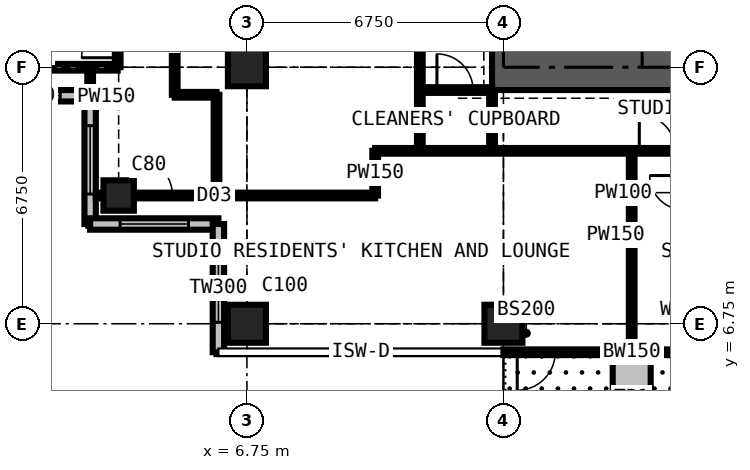
"""IFC4 building model, lengths in metres.
Left out: names, types, materials, properties, quantities, classifications, styles, units other than length and angle.
Written with IfcOpenShell. Run it as: python <this file> out.ifc"""

import sys

from ifc_helpers import new_model, si_unit, direction, frame, frame_2d, origin, origin_2d, place, context, subcontext, project, spatial, rectangle, extrude, element, fill, save


model = new_model("IFC4")
c1 = context("Model", 3, precision=1e-05, world=origin(), true_north=direction((0.0, 1.0)))
c2 = subcontext(c1, "Body", "Model", "MODEL_VIEW")
j1 = project(units=[si_unit("LENGTHUNIT", "METRE"), si_unit("PLANEANGLEUNIT", "RADIAN")], contexts=[c1])
p1 = place(None, origin())
s1 = spatial("IfcSite", under=j1, at=p1, CompositionType="ELEMENT")
p2 = place(p1, origin())
s2 = spatial("IfcBuilding", under=s1, at=p2, CompositionType="ELEMENT")
p3 = place(p2, frame((0.0, 0.0, 240.3)))
s3 = spatial("IfcBuildingStorey", under=s2, at=p3, CompositionType="ELEMENT", Elevation=240.3)
p4 = place(p3, frame((3.375, 10.125, 0.0), z_axis=(0.0, 0.0, 1.0), x_axis=(1.0, 0.0, 0.0)))
e1 = element("IfcColumn", 1, at=p4, inside=s3, PredefinedType="COLUMN", context=c2, shape_type="SweptSolid", body=[
    extrude(rectangle(XDim=0.8, YDim=0.8, at=origin_2d()), origin(), (0.0, 0.0, 1.0), 3.6),
])
for number, where, z_axis, x_axis in (
    (2, (6.75, 6.75, 0.0), (0.0, 0.0, 1.0), (1.0, 0.0, 0.0)),
    (3, (6.75, 13.5, 0.0), (0.0, 0.0, 1.0), (1.0, 0.0, 0.0)),
    (4, (13.5, 6.75, 0.0), (0.0, 0.0, 1.0), (1.0, 0.0, 0.0)),
):
    element("IfcColumn", number, at=place(p3, frame(where, z_axis=z_axis, x_axis=x_axis)), inside=s3, PredefinedType="COLUMN", context=c2, shape_type="SweptSolid", body=[
        extrude(rectangle(XDim=1.0, YDim=1.0, at=origin_2d()), origin(), (0.0, 0.0, 1.0), 3.6),
    ])
p5 = place(p3, frame((13.2, 13.5, 0.0), z_axis=(0.0, 0.0, 1.0), x_axis=(1.0, 0.0, 0.0)))
e5 = element("IfcWall", 5, at=p5, inside=s3, PredefinedType="SHEAR", context=c2, shape_type="SweptSolid", body=[
    extrude(rectangle(XDim=14.1, YDim=1.2, at=frame_2d((7.05, 0.0))), origin(), (0.0, 0.0, 1.0), 3.6),
])
p6 = place(p3, frame((-0.75, 12.75, 0.0), z_axis=(0.0, 0.0, 1.0), x_axis=(1.0, 0.0, 0.0)))
e6 = element("IfcWall", 6, at=p6, inside=s3, PredefinedType="SOLIDWALL", context=c2, shape_type="SweptSolid", body=[
    extrude(rectangle(XDim=3.375, YDim=0.3, at=frame_2d((1.688, 0.0))), origin(), (0.0, 0.0, 1.0), 3.375),
])
p7 = place(p6, frame((0.788, 0.0, 0.6)))
e7 = element("IfcOpeningElement", 7, at=p7, cuts=e6, PredefinedType="OPENING", context=c2, shape_type="SweptSolid", body=[
    extrude(rectangle(XDim=1.8, YDim=2.1, at=frame_2d((0.9, 1.05))), frame((0.0, 0.16, 0.0), z_axis=(0.0, -1.0, 0.0), x_axis=(1.0, 0.0, 0.0)), (0.0, 0.0, 1.0), 0.32),
])
p8 = place(p3, frame((2.625, 12.75, 0.0), z_axis=(0.0, 0.0, 1.0), x_axis=(0.0, -1.0, 0.0)))
e8 = element("IfcWall", 8, at=p8, inside=s3, PredefinedType="SOLIDWALL", context=c2, shape_type="SweptSolid", body=[
    extrude(rectangle(XDim=3.375, YDim=0.3, at=frame_2d((1.688, 0.0))), origin(), (0.0, 0.0, 1.0), 3.375),
])
p9 = place(p8, frame((0.788, 0.0, 0.6)))
e9 = element("IfcOpeningElement", 9, at=p9, cuts=e8, PredefinedType="OPENING", context=c2, shape_type="SweptSolid", body=[
    extrude(rectangle(XDim=1.8, YDim=2.1, at=frame_2d((0.9, 1.05))), frame((0.0, 0.16, 0.0), z_axis=(0.0, -1.0, 0.0), x_axis=(1.0, 0.0, 0.0)), (0.0, 0.0, 1.0), 0.32),
])
p10 = place(p3, frame((2.625, 9.375, 0.0), z_axis=(0.0, 0.0, 1.0), x_axis=(1.0, 0.0, 0.0)))
e10 = element("IfcWall", 10, at=p10, inside=s3, PredefinedType="SOLIDWALL", context=c2, shape_type="SweptSolid", body=[
    extrude(rectangle(XDim=3.375, YDim=0.3, at=frame_2d((1.688, 0.0))), origin(), (0.0, 0.0, 1.0), 3.375),
])
p11 = place(p10, frame((0.788, 0.0, 0.6)))
e11 = element("IfcOpeningElement", 11, at=p11, cuts=e10, PredefinedType="OPENING", context=c2, shape_type="SweptSolid", body=[
    extrude(rectangle(XDim=1.8, YDim=2.1, at=frame_2d((0.9, 1.05))), frame((0.0, 0.16, 0.0), z_axis=(0.0, -1.0, 0.0), x_axis=(1.0, 0.0, 0.0)), (0.0, 0.0, 1.0), 0.32),
])
p12 = place(p3, frame((6.0, 9.375, 0.0), z_axis=(0.0, 0.0, 1.0), x_axis=(0.0, -1.0, 0.0)))
e12 = element("IfcWall", 12, at=p12, inside=s3, PredefinedType="SOLIDWALL", context=c2, shape_type="SweptSolid", body=[
    extrude(rectangle(XDim=3.375, YDim=0.3, at=frame_2d((1.688, 0.0))), origin(), (0.0, 0.0, 1.0), 3.375),
])
p13 = place(p12, frame((0.788, 0.0, 0.6)))
e13 = element("IfcOpeningElement", 13, at=p13, cuts=e12, PredefinedType="OPENING", context=c2, shape_type="SweptSolid", body=[
    extrude(rectangle(XDim=1.8, YDim=2.1, at=frame_2d((0.9, 1.05))), frame((0.0, 0.16, 0.0), z_axis=(0.0, -1.0, 0.0), x_axis=(1.0, 0.0, 0.0)), (0.0, 0.0, 1.0), 0.32),
])
p14 = place(p3, frame((20.25, 6.0, 0.0), z_axis=(0.0, 0.0, 1.0), x_axis=(-1.0, 0.0, 0.0)))
e14 = element("IfcWall", 14, at=p14, inside=s3, PredefinedType="SOLIDWALL", context=c2, shape_type="SweptSolid", body=[
    extrude(rectangle(XDim=6.75, YDim=0.15, at=frame_2d((3.375, 0.0))), origin(), (0.0, 0.0, 1.0), 3.375),
])
p15 = place(p14, frame((0.363, 0.0, 0.0)))
e15 = element("IfcOpeningElement", 15, at=p15, cuts=e14, PredefinedType="OPENING", context=c2, shape_type="SweptSolid", body=[
    extrude(rectangle(XDim=1.0, YDim=2.2, at=frame_2d((0.5, 1.1))), frame((0.0, 0.085, 0.0), z_axis=(0.0, -1.0, 0.0), x_axis=(1.0, 0.0, 0.0)), (0.0, 0.0, 1.0), 0.17),
])
p16 = place(p14, frame((1.725, 0.0, 0.9)))
e16 = element("IfcOpeningElement", 16, at=p16, cuts=e14, PredefinedType="OPENING", context=c2, shape_type="SweptSolid", body=[
    extrude(rectangle(XDim=1.2, YDim=1.8, at=frame_2d((0.6, 0.9))), frame((0.0, 0.085, 0.0), z_axis=(0.0, -1.0, 0.0), x_axis=(1.0, 0.0, 0.0)), (0.0, 0.0, 1.0), 0.17),
])
p17 = place(p14, frame((5.387, 0.0, 0.0)))
e17 = element("IfcOpeningElement", 17, at=p17, cuts=e14, PredefinedType="OPENING", context=c2, shape_type="SweptSolid", body=[
    extrude(rectangle(XDim=1.0, YDim=2.2, at=frame_2d((0.5, 1.1))), frame((0.0, 0.085, 0.0), z_axis=(0.0, -1.0, 0.0), x_axis=(1.0, 0.0, 0.0)), (0.0, 0.0, 1.0), 0.17),
])
p18 = place(p14, frame((3.825, 0.0, 0.9)))
e18 = element("IfcOpeningElement", 18, at=p18, cuts=e14, PredefinedType="OPENING", context=c2, shape_type="SweptSolid", body=[
    extrude(rectangle(XDim=1.2, YDim=1.8, at=frame_2d((0.6, 0.9))), frame((0.0, 0.085, 0.0), z_axis=(0.0, -1.0, 0.0), x_axis=(1.0, 0.0, 0.0)), (0.0, 0.0, 1.0), 0.17),
])
p19 = place(p3, frame((16.875, 5.9, 0.0), z_axis=(0.0, 0.0, 1.0), x_axis=(0.0, -1.0, 0.0)))
e19 = element("IfcWall", 19, at=p19, inside=s3, PredefinedType="USERDEFINED", context=c2, shape_type="SweptSolid", body=[
    extrude(rectangle(XDim=2.2, YDim=1.0, at=frame_2d((1.1, 0.0))), origin(), (0.0, 0.0, 1.0), 0.9),
])
p20 = place(p3, frame((-0.734, 13.5, 0.0), z_axis=(0.0, 0.0, 1.0), x_axis=(1.0, 0.0, 0.0)))
e20 = element("IfcWall", 20, at=p20, inside=s3, PredefinedType="PARTITIONING", context=c2, shape_type="SweptSolid", body=[
    extrude(rectangle(XDim=4.084, YDim=0.175, at=frame_2d((2.042, 0.0))), origin(), (0.0, 0.0, 1.0), 2.877),
])
p21 = place(p3, frame((2.625, 12.766, 0.0), z_axis=(0.0, 0.0, 1.0), x_axis=(0.0, 1.0, 0.0)))
e21 = element("IfcWall", 21, at=p21, inside=s3, PredefinedType="PARTITIONING", context=c2, shape_type="SweptSolid", body=[
    extrude(rectangle(XDim=0.734, YDim=0.15, at=frame_2d((0.367, 0.0))), origin(), (0.0, 0.0, 1.0), 3.375),
])
p22 = place(p3, frame((2.775, 10.125, 0.0), z_axis=(0.0, 0.0, 1.0), x_axis=(1.0, 0.0, 0.0)))
e22 = element("IfcWall", 22, at=p22, inside=s3, PredefinedType="PARTITIONING", context=c2, shape_type="SweptSolid", body=[
    extrude(rectangle(XDim=7.35, YDim=0.15, at=frame_2d((3.675, 0.0))), origin(), (0.0, 0.0, 1.0), 2.877),
])
p23 = place(p22, frame((1.016, 0.0, 0.0)))
e23 = element("IfcOpeningElement", 23, at=p23, cuts=e22, PredefinedType="OPENING", context=c2, shape_type="SweptSolid", body=[
    extrude(rectangle(XDim=1.0, YDim=2.2, at=frame_2d((0.5, 1.1))), frame((0.0, 0.085, 0.0), z_axis=(0.0, -1.0, 0.0), x_axis=(1.0, 0.0, 0.0)), (0.0, 0.0, 1.0), 0.17),
])
p24 = place(p3, frame((3.35, 13.5, 0.0), z_axis=(0.0, 0.0, 1.0), x_axis=(0.0, 1.0, 0.0)))
e24 = element("IfcWall", 24, at=p24, inside=s3, PredefinedType="PARTITIONING", context=c2, shape_type="SweptSolid", body=[
    extrude(rectangle(XDim=13.5, YDim=0.15, at=frame_2d((6.75, 0.0))), origin(), (0.0, 0.0, 1.0), 3.375),
])
p25 = place(p24, frame((10.325, 0.0, 0.0)))
e25 = element("IfcOpeningElement", 25, at=p25, cuts=e24, PredefinedType="OPENING", context=c2, shape_type="SweptSolid", body=[
    extrude(rectangle(XDim=0.95, YDim=2.2, at=frame_2d((0.475, 1.1))), frame((0.0, 0.085, 0.0), z_axis=(0.0, -1.0, 0.0), x_axis=(1.0, 0.0, 0.0)), (0.0, 0.0, 1.0), 0.17),
])
p26 = place(p24, frame((0.25, 0.0, 0.0)))
e26 = element("IfcOpeningElement", 26, at=p26, cuts=e24, PredefinedType="OPENING", context=c2, shape_type="SweptSolid", body=[
    extrude(rectangle(XDim=0.95, YDim=2.2, at=frame_2d((0.475, 1.1))), frame((0.0, 0.085, 0.0), z_axis=(0.0, -1.0, 0.0), x_axis=(1.0, 0.0, 0.0)), (0.0, 0.0, 1.0), 0.17),
])
p27 = place(p24, frame((3.575, 0.0, 0.0)))
e27 = element("IfcOpeningElement", 27, at=p27, cuts=e24, PredefinedType="OPENING", context=c2, shape_type="SweptSolid", body=[
    extrude(rectangle(XDim=0.95, YDim=2.2, at=frame_2d((0.475, 1.1))), frame((0.0, 0.085, 0.0), z_axis=(0.0, -1.0, 0.0), x_axis=(1.0, 0.0, 0.0)), (0.0, 0.0, 1.0), 0.17),
])
p28 = place(p24, frame((6.95, 0.0, 0.0)))
e28 = element("IfcOpeningElement", 28, at=p28, cuts=e24, PredefinedType="OPENING", context=c2, shape_type="SweptSolid", body=[
    extrude(rectangle(XDim=0.95, YDim=2.2, at=frame_2d((0.475, 1.1))), frame((0.0, 0.085, 0.0), z_axis=(0.0, -1.0, 0.0), x_axis=(1.0, 0.0, 0.0)), (0.0, 0.0, 1.0), 0.17),
])
p29 = place(p3, frame((4.85, 12.775, 0.0), z_axis=(0.0, 0.0, 1.0), x_axis=(0.0, 1.0, 0.0)))
e29 = element("IfcWall", 29, at=p29, inside=s3, PredefinedType="PARTITIONING", context=c2, shape_type="SweptSolid", body=[
    extrude(rectangle(XDim=8.113, YDim=0.15, at=frame_2d((4.056, 0.0))), origin(), (0.0, 0.0, 1.0), 3.375),
])
p30 = place(p29, frame((3.6, 0.0, 0.0)))
e30 = element("IfcOpeningElement", 30, at=p30, cuts=e29, PredefinedType="OPENING", context=c2, shape_type="SweptSolid", body=[
    extrude(rectangle(XDim=0.95, YDim=2.2, at=frame_2d((0.475, 1.1))), frame((0.0, 0.085, 0.0), z_axis=(0.0, -1.0, 0.0), x_axis=(1.0, 0.0, 0.0)), (0.0, 0.0, 1.0), 0.17),
])
p31 = place(p3, frame((4.85, 12.775, 0.0), z_axis=(0.0, 0.0, 1.0), x_axis=(1.0, 0.0, 0.0)))
e31 = element("IfcWall", 31, at=p31, inside=s3, PredefinedType="PARTITIONING", context=c2, shape_type="SweptSolid", body=[
    extrude(rectangle(XDim=1.1, YDim=0.15, at=frame_2d((0.55, 0.0))), origin(), (0.0, 0.0, 1.0), 3.375),
])
p32 = place(p3, frame((5.95, 10.125, 0.0), z_axis=(0.0, 0.0, 1.0), x_axis=(0.0, 1.0, 0.0)))
e32 = element("IfcWall", 32, at=p32, inside=s3, PredefinedType="PARTITIONING", context=c2, shape_type="SweptSolid", body=[
    extrude(rectangle(XDim=2.65, YDim=0.15, at=frame_2d((1.325, 0.0))), origin(), (0.0, 0.0, 1.0), 3.375),
])
p33 = place(p3, frame((10.125, 10.125, 0.0), z_axis=(0.0, 0.0, 1.0), x_axis=(0.0, 1.0, 0.0)))
e33 = element("IfcWall", 33, at=p33, inside=s3, PredefinedType="PARTITIONING", context=c2, shape_type="SweptSolid", body=[
    extrude(rectangle(XDim=1.175, YDim=0.15, at=frame_2d((0.587, 0.0))), origin(), (0.0, 0.0, 1.0), 3.375),
])
p34 = place(p3, frame((10.125, 11.3, 0.0), z_axis=(0.0, 0.0, 1.0), x_axis=(1.0, 0.0, 0.0)))
e34 = element("IfcWall", 34, at=p34, inside=s3, PredefinedType="PARTITIONING", context=c2, shape_type="SweptSolid", body=[
    extrude(rectangle(XDim=20.25, YDim=0.15, at=frame_2d((10.125, 0.0))), origin(), (0.0, 0.0, 1.0), 3.375),
])
p35 = place(p34, frame((6.95, 0.0, 0.0)))
e35 = element("IfcOpeningElement", 35, at=p35, cuts=e34, PredefinedType="OPENING", context=c2, shape_type="SweptSolid", body=[
    extrude(rectangle(XDim=0.95, YDim=2.2, at=frame_2d((0.475, 1.1))), frame((0.0, 0.085, 0.0), z_axis=(0.0, -1.0, 0.0), x_axis=(1.0, 0.0, 0.0)), (0.0, 0.0, 1.0), 0.17),
])
p36 = place(p34, frame((10.375, 0.0, 0.0)))
e36 = element("IfcOpeningElement", 36, at=p36, cuts=e34, PredefinedType="OPENING", context=c2, shape_type="SweptSolid", body=[
    extrude(rectangle(XDim=0.95, YDim=2.2, at=frame_2d((0.475, 1.1))), frame((0.0, 0.085, 0.0), z_axis=(0.0, -1.0, 0.0), x_axis=(1.0, 0.0, 0.0)), (0.0, 0.0, 1.0), 0.17),
])
p37 = place(p34, frame((13.75, 0.0, 0.0)))
e37 = element("IfcOpeningElement", 37, at=p37, cuts=e34, PredefinedType="OPENING", context=c2, shape_type="SweptSolid", body=[
    extrude(rectangle(XDim=0.95, YDim=2.2, at=frame_2d((0.475, 1.1))), frame((0.0, 0.085, 0.0), z_axis=(0.0, -1.0, 0.0), x_axis=(1.0, 0.0, 0.0)), (0.0, 0.0, 1.0), 0.17),
])
p38 = place(p34, frame((17.475, 0.0, 0.0)))
e38 = element("IfcOpeningElement", 38, at=p38, cuts=e34, PredefinedType="OPENING", context=c2, shape_type="SweptSolid", body=[
    extrude(rectangle(XDim=1.0, YDim=2.2, at=frame_2d((0.5, 1.1))), frame((0.0, 0.085, 0.0), z_axis=(0.0, -1.0, 0.0), x_axis=(1.0, 0.0, 0.0)), (0.0, 0.0, 1.0), 0.17),
])
p39 = place(p3, frame((11.3, 11.3, 0.0), z_axis=(0.0, 0.0, 1.0), x_axis=(0.0, 1.0, 0.0)))
e39 = element("IfcWall", 39, at=p39, inside=s3, PredefinedType="PARTITIONING", context=c2, shape_type="SweptSolid", body=[
    extrude(rectangle(XDim=19.3, YDim=0.15, at=frame_2d((9.65, 0.0))), origin(), (0.0, 0.0, 1.0), 3.375),
])
p40 = place(p39, frame((13.525, 0.0, 0.0)))
e40 = element("IfcOpeningElement", 40, at=p40, cuts=e39, PredefinedType="OPENING", context=c2, shape_type="SweptSolid", body=[
    extrude(rectangle(XDim=1.0, YDim=2.2, at=frame_2d((0.5, 1.1))), frame((0.0, 0.085, 0.0), z_axis=(0.0, -1.0, 0.0), x_axis=(1.0, 0.0, 0.0)), (0.0, 0.0, 1.0), 0.17),
])
p41 = place(p39, frame((10.438, 0.0, 0.0)))
e41 = element("IfcOpeningElement", 41, at=p41, cuts=e39, PredefinedType="OPENING", context=c2, shape_type="SweptSolid", body=[
    extrude(rectangle(XDim=1.0, YDim=2.2, at=frame_2d((0.5, 1.1))), frame((0.0, 0.085, 0.0), z_axis=(0.0, -1.0, 0.0), x_axis=(1.0, 0.0, 0.0)), (0.0, 0.0, 1.0), 0.17),
])
p42 = place(p3, frame((11.3, 12.9, 0.0), z_axis=(0.0, 0.0, 1.0), x_axis=(1.0, 0.0, 0.0)))
e42 = element("IfcWall", 42, at=p42, inside=s3, PredefinedType="PARTITIONING", context=c2, shape_type="SweptSolid", body=[
    extrude(rectangle(XDim=1.9, YDim=0.15, at=frame_2d((0.95, 0.0))), origin(), (0.0, 0.0, 1.0), 2.877),
])
p43 = place(p42, frame((0.45, 0.0, 0.0)))
e43 = element("IfcOpeningElement", 43, at=p43, cuts=e42, PredefinedType="OPENING", context=c2, shape_type="SweptSolid", body=[
    extrude(rectangle(XDim=0.95, YDim=2.2, at=frame_2d((0.475, 1.1))), frame((0.0, 0.085, 0.0), z_axis=(0.0, -1.0, 0.0), x_axis=(1.0, 0.0, 0.0)), (0.0, 0.0, 1.0), 0.17),
])
p44 = place(p3, frame((13.2, 11.3, 0.0), z_axis=(0.0, 0.0, 1.0), x_axis=(0.0, 1.0, 0.0)))
e44 = element("IfcWall", 44, at=p44, inside=s3, PredefinedType="PARTITIONING", context=c2, shape_type="SweptSolid", body=[
    extrude(rectangle(XDim=1.6, YDim=0.15, at=frame_2d((0.8, 0.0))), origin(), (0.0, 0.0, 1.0), 3.375),
])
p45 = place(p3, frame((16.875, 6.016, 0.0), z_axis=(0.0, 0.0, 1.0), x_axis=(0.0, 1.0, 0.0)))
e45 = element("IfcWall", 45, at=p45, inside=s3, PredefinedType="PARTITIONING", context=c2, shape_type="SweptSolid", body=[
    extrude(rectangle(XDim=5.284, YDim=0.15, at=frame_2d((2.642, 0.0))), origin(), (0.0, 0.0, 1.0), 3.375),
])
p46 = place(p7, origin())
e46 = element("IfcWindow", 46, at=p46, inside=s3, PartitioningType="SINGLE_PANEL", PredefinedType="WINDOW", context=c2, shape_type="SweptSolid", body=[
    extrude(rectangle(XDim=1.8, YDim=2.1, at=frame_2d((0.9, 1.05))), frame((0.0, 0.03, 0.0), z_axis=(0.0, -1.0, 0.0), x_axis=(1.0, 0.0, 0.0)), (0.0, 0.0, 1.0), 0.06),
])
fill(e7, e46)
p47 = place(p9, origin())
e47 = element("IfcWindow", 47, at=p47, inside=s3, PartitioningType="SINGLE_PANEL", PredefinedType="WINDOW", context=c2, shape_type="SweptSolid", body=[
    extrude(rectangle(XDim=1.8, YDim=2.1, at=frame_2d((0.9, 1.05))), frame((0.0, 0.03, 0.0), z_axis=(0.0, -1.0, 0.0), x_axis=(1.0, 0.0, 0.0)), (0.0, 0.0, 1.0), 0.06),
])
fill(e9, e47)
p48 = place(p11, origin())
e48 = element("IfcWindow", 48, at=p48, inside=s3, PartitioningType="SINGLE_PANEL", PredefinedType="WINDOW", context=c2, shape_type="SweptSolid", body=[
    extrude(rectangle(XDim=1.8, YDim=2.1, at=frame_2d((0.9, 1.05))), frame((0.0, 0.03, 0.0), z_axis=(0.0, -1.0, 0.0), x_axis=(1.0, 0.0, 0.0)), (0.0, 0.0, 1.0), 0.06),
])
fill(e11, e48)
p49 = place(p13, origin())
e49 = element("IfcWindow", 49, at=p49, inside=s3, PartitioningType="SINGLE_PANEL", PredefinedType="WINDOW", context=c2, shape_type="SweptSolid", body=[
    extrude(rectangle(XDim=1.8, YDim=2.1, at=frame_2d((0.9, 1.05))), frame((0.0, 0.03, 0.0), z_axis=(0.0, -1.0, 0.0), x_axis=(1.0, 0.0, 0.0)), (0.0, 0.0, 1.0), 0.06),
])
fill(e13, e49)
p50 = place(p16, origin())
e50 = element("IfcWindow", 50, at=p50, inside=s3, PartitioningType="SINGLE_PANEL", PredefinedType="WINDOW", context=c2, shape_type="SweptSolid", body=[
    extrude(rectangle(XDim=1.2, YDim=1.8, at=frame_2d((0.6, 0.9))), frame((0.0, 0.03, 0.0), z_axis=(0.0, -1.0, 0.0), x_axis=(1.0, 0.0, 0.0)), (0.0, 0.0, 1.0), 0.06),
])
fill(e16, e50)
p51 = place(p17, origin())
e51 = element("IfcDoor", 51, at=p51, inside=s3, OperationType="SINGLE_SWING_RIGHT", PredefinedType="DOOR", context=c2, shape_type="SweptSolid", body=[
    extrude(rectangle(XDim=1.0, YDim=2.2, at=frame_2d((0.5, 1.1))), frame((0.0, 0.025, 0.0), z_axis=(0.0, -1.0, 0.0), x_axis=(1.0, 0.0, 0.0)), (0.0, 0.0, 1.0), 0.05),
])
fill(e17, e51)
p52 = place(p18, origin())
e52 = element("IfcWindow", 52, at=p52, inside=s3, PartitioningType="SINGLE_PANEL", PredefinedType="WINDOW", context=c2, shape_type="SweptSolid", body=[
    extrude(rectangle(XDim=1.2, YDim=1.8, at=frame_2d((0.6, 0.9))), frame((0.0, 0.03, 0.0), z_axis=(0.0, -1.0, 0.0), x_axis=(1.0, 0.0, 0.0)), (0.0, 0.0, 1.0), 0.06),
])
fill(e18, e52)
p53 = place(p43, origin())
e53 = element("IfcDoor", 53, at=p53, inside=s3, OperationType="SINGLE_SWING_LEFT", PredefinedType="DOOR", context=c2, shape_type="SweptSolid", body=[
    extrude(rectangle(XDim=0.95, YDim=2.2, at=frame_2d((0.475, 1.1))), frame((0.0, 0.025, 0.0), z_axis=(0.0, -1.0, 0.0), x_axis=(1.0, 0.0, 0.0)), (0.0, 0.0, 1.0), 0.05),
])
fill(e43, e53)
p54 = place(p23, origin())
e54 = element("IfcDoor", 54, at=p54, inside=s3, OperationType="SINGLE_SWING_LEFT", PredefinedType="DOOR", context=c2, shape_type="SweptSolid", body=[
    extrude(rectangle(XDim=1.0, YDim=2.2, at=frame_2d((0.5, 1.1))), frame((0.0, 0.025, 0.0), z_axis=(0.0, -1.0, 0.0), x_axis=(1.0, 0.0, 0.0)), (0.0, 0.0, 1.0), 0.05),
])
fill(e23, e54)
p55 = place(p35, origin())
e55 = element("IfcDoor", 55, at=p55, inside=s3, OperationType="SINGLE_SWING_LEFT", PredefinedType="DOOR", context=c2, shape_type="SweptSolid", body=[
    extrude(rectangle(XDim=0.95, YDim=2.2, at=frame_2d((0.475, 1.1))), frame((0.0, 0.025, 0.0), z_axis=(0.0, -1.0, 0.0), x_axis=(1.0, 0.0, 0.0)), (0.0, 0.0, 1.0), 0.05),
])
fill(e35, e55)
p56 = place(p26, origin())
e56 = element("IfcDoor", 56, at=p56, inside=s3, OperationType="SINGLE_SWING_LEFT", PredefinedType="DOOR", context=c2, shape_type="SweptSolid", body=[
    extrude(rectangle(XDim=0.95, YDim=2.2, at=frame_2d((0.475, 1.1))), frame((0.0, 0.025, 0.0), z_axis=(0.0, -1.0, 0.0), x_axis=(1.0, 0.0, 0.0)), (0.0, 0.0, 1.0), 0.05),
])
fill(e26, e56)
save(model, sys.argv[1])
